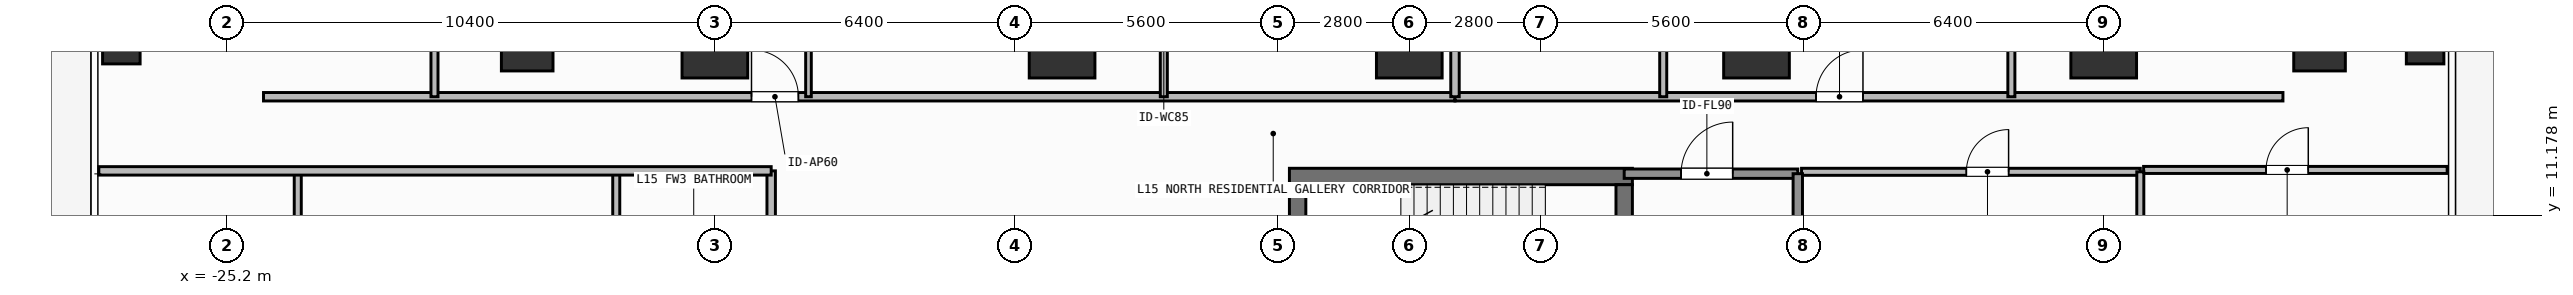
"""IFC4 building model, lengths in metres.
Left out: names, types, materials, properties, quantities, classifications, styles, units other than length and angle.
Written with IfcOpenShell. Run it as: python <this file> out.ifc"""

import sys

from ifc_helpers import new_model, si_unit, direction, frame, frame_2d, origin, origin_2d, place, context, subcontext, project, spatial, rectangle, hollow_rectangle, extrude, element, fill, save


model = new_model("IFC4")
c1 = context("Model", 3, precision=1e-05, world=origin(), true_north=direction((0.0, 1.0)))
c2 = subcontext(c1, "Body", "Model", "MODEL_VIEW")
j1 = project(units=[si_unit("LENGTHUNIT", "METRE"), si_unit("PLANEANGLEUNIT", "RADIAN")], contexts=[c1])
p1 = place(None, origin())
s1 = spatial("IfcSite", under=j1, at=p1, CompositionType="ELEMENT")
p2 = place(p1, origin())
s2 = spatial("IfcBuilding", under=s1, at=p2, CompositionType="ELEMENT")
p3 = place(p2, frame((0.0, 0.0, 57.9)))
s3 = spatial("IfcBuildingStorey", under=s2, at=p3, CompositionType="ELEMENT", Elevation=57.9)
p4 = place(p3, frame((-2.555, 12.0, 0.0), z_axis=(0.0, 0.0, 1.0), x_axis=(1.0, 0.0, 0.0)))
e1 = element("IfcWall", 1, at=p4, inside=s3, PredefinedType="SHEAR", context=c2, shape_type="SweptSolid", body=[
    extrude(rectangle(XDim=7.31, YDim=0.35, at=frame_2d((3.655, 0.0))), origin(), (0.0, 0.0, 1.0), 3.9),
])
p5 = place(p3, frame((-2.38, 8.9, 0.0), z_axis=(0.0, 0.0, 1.0), x_axis=(0.0, 1.0, 0.0)))
e2 = element("IfcWall", 2, at=p5, inside=s3, PredefinedType="SHEAR", context=c2, shape_type="SweptSolid", body=[
    extrude(rectangle(XDim=2.925, YDim=0.35, at=frame_2d((1.462, 0.0))), origin(), (0.0, 0.0, 1.0), 3.9),
])
p6 = place(p3, frame((4.58, 11.825, 0.0), z_axis=(0.0, 0.0, 1.0), x_axis=(0.0, -1.0, 0.0)))
e3 = element("IfcWall", 3, at=p6, inside=s3, PredefinedType="SHEAR", context=c2, shape_type="SweptSolid", body=[
    extrude(rectangle(XDim=2.925, YDim=0.35, at=frame_2d((1.462, 0.0))), origin(), (0.0, 0.0, 1.0), 3.9),
])
p7 = place(p6, frame((0.913, 0.0, 0.0)))
e4 = element("IfcOpeningElement", 4, at=p7, cuts=e3, PredefinedType="OPENING", context=c2, shape_type="SweptSolid", body=[
    extrude(rectangle(XDim=1.1, YDim=2.15, at=frame_2d((0.55, 1.075))), frame((0.0, 0.185, 0.0), z_axis=(0.0, -1.0, 0.0), x_axis=(1.0, 0.0, 0.0)), (0.0, 0.0, 1.0), 0.37),
])
for number, where, z_axis, x_axis in (
    (5, (-14.8, 14.8, 0.0), (0.0, 0.0, 1.0), (1.0, 0.0, 0.0)),
    (6, (-7.4, 14.8, 0.0), (0.0, 0.0, 1.0), (1.0, 0.0, 0.0)),
    (7, (0.0, 14.8, 0.0), (0.0, 0.0, 1.0), (1.0, 0.0, 0.0)),
    (8, (7.4, 14.8, 0.0), (0.0, 0.0, 1.0), (1.0, 0.0, 0.0)),
    (9, (14.8, 14.8, 0.0), (0.0, 0.0, 1.0), (1.0, 0.0, 0.0)),
):
    element("IfcColumn", number, at=place(p3, frame(where, z_axis=z_axis, x_axis=x_axis)), inside=s3, PredefinedType="COLUMN", context=c2, shape_type="SweptSolid", body=[
        extrude(rectangle(XDim=1.4, YDim=1.4, at=origin_2d()), origin(), (0.0, 0.0, 1.0), 3.9),
    ])
for number, where, z_axis, x_axis in (
    (10, (-18.8, 14.8, 0.0), (0.0, 0.0, 1.0), (1.0, 0.0, 0.0)),
    (11, (19.4, 14.8, 0.0), (0.0, 0.0, 1.0), (1.0, 0.0, 0.0)),
):
    element("IfcColumn", number, at=place(p3, frame(where, z_axis=z_axis, x_axis=x_axis)), inside=s3, PredefinedType="COLUMN", context=c2, shape_type="SweptSolid", body=[
        extrude(rectangle(XDim=1.1, YDim=1.1, at=origin_2d()), origin(), (0.0, 0.0, 1.0), 3.9),
    ])
for number, where, z_axis, x_axis in (
    (12, (-27.45, 14.8, 0.0), (0.0, 0.0, 1.0), (1.0, 0.0, 0.0)),
    (13, (21.65, 14.8, 0.0), (0.0, 0.0, 1.0), (1.0, 0.0, 0.0)),
):
    element("IfcColumn", number, at=place(p3, frame(where, z_axis=z_axis, x_axis=x_axis)), inside=s3, PredefinedType="COLUMN", context=c2, shape_type="SweptSolid", body=[
        extrude(hollow_rectangle(XDim=0.8, YDim=0.8, WallThickness=0.036, at=origin_2d()), origin(), (0.0, 0.0, 1.0), 3.9),
    ])
p8 = place(p3, frame((4.58, 12.06, 0.0), z_axis=(0.0, 0.0, 1.0), x_axis=(1.0, 0.0, 0.0)))
e14 = element("IfcWall", 14, at=p8, inside=s3, PredefinedType="SOLIDWALL", context=c2, shape_type="SweptSolid", body=[
    extrude(rectangle(XDim=3.7, YDim=0.2, at=frame_2d((1.85, 0.0))), origin(), (0.0, 0.0, 1.0), 3.68),
])
p9 = place(p8, frame((1.212, 0.0, 0.0)))
e15 = element("IfcOpeningElement", 15, at=p9, cuts=e14, PredefinedType="OPENING", context=c2, shape_type="SweptSolid", body=[
    extrude(rectangle(XDim=1.1, YDim=2.15, at=frame_2d((0.55, 1.075))), frame((0.0, 0.11, 0.0), z_axis=(0.0, -1.0, 0.0), x_axis=(1.0, 0.0, 0.0)), (0.0, 0.0, 1.0), 0.22),
])
p10 = place(p3, frame((8.36, 12.1, 0.0), z_axis=(0.0, 0.0, 1.0), x_axis=(1.0, 0.0, 0.0)))
e16 = element("IfcWall", 16, at=p10, inside=s3, PredefinedType="PARTITIONING", context=c2, shape_type="SweptSolid", body=[
    extrude(rectangle(XDim=7.22, YDim=0.15, at=frame_2d((3.61, 0.0))), origin(), (0.0, 0.0, 1.0), 3.68),
])
p11 = place(p10, frame((3.513, 0.0, 0.0)))
e17 = element("IfcOpeningElement", 17, at=p11, cuts=e16, PredefinedType="OPENING", context=c2, shape_type="SweptSolid", body=[
    extrude(rectangle(XDim=0.9, YDim=2.1, at=frame_2d((0.45, 1.05))), frame((0.0, 0.085, 0.0), z_axis=(0.0, -1.0, 0.0), x_axis=(1.0, 0.0, 0.0)), (0.0, 0.0, 1.0), 0.17),
])
p12 = place(p3, frame((-24.42, 13.7, 0.0), z_axis=(0.0, 0.0, 1.0), x_axis=(1.0, 0.0, 0.0)))
e18 = element("IfcWall", 18, at=p12, inside=s3, PredefinedType="PARTITIONING", context=c2, shape_type="SweptSolid", body=[
    extrude(rectangle(XDim=25.394, YDim=0.18, at=frame_2d((12.697, 0.0))), origin(), (0.0, 0.0, 1.0), 3.68),
])
p13 = place(p12, frame((10.4, 0.0, 0.0)))
e19 = element("IfcOpeningElement", 19, at=p13, cuts=e18, PredefinedType="OPENING", context=c2, shape_type="SweptSolid", body=[
    extrude(rectangle(XDim=1.0, YDim=2.2, at=frame_2d((0.5, 1.1))), frame((0.0, 0.1, 0.0), z_axis=(0.0, -1.0, 0.0), x_axis=(1.0, 0.0, 0.0)), (0.0, 0.0, 1.0), 0.2),
])
p14 = place(p3, frame((-12.805, 13.7, 0.0), z_axis=(0.0, 0.0, 1.0), x_axis=(0.0, 1.0, 0.0)))
e20 = element("IfcWall", 20, at=p14, inside=s3, PredefinedType="PARTITIONING", context=c2, shape_type="SweptSolid", body=[
    extrude(rectangle(XDim=7.09, YDim=0.12, at=frame_2d((3.545, 0.0))), origin(), (0.0, 0.0, 1.0), 3.68),
])
p15 = place(p14, frame((3.006, 0.0, 0.0)))
e21 = element("IfcOpeningElement", 21, at=p15, cuts=e20, PredefinedType="OPENING", context=c2, shape_type="SweptSolid", body=[
    extrude(rectangle(XDim=0.9, YDim=2.1, at=frame_2d((0.45, 1.05))), frame((0.0, 0.07, 0.0), z_axis=(0.0, -1.0, 0.0), x_axis=(1.0, 0.0, 0.0)), (0.0, 0.0, 1.0), 0.14),
])
p16 = place(p3, frame((-20.776, 13.7, 0.0), z_axis=(0.0, 0.0, 1.0), x_axis=(0.0, 1.0, 0.0)))
e22 = element("IfcWall", 22, at=p16, inside=s3, PredefinedType="PARTITIONING", context=c2, shape_type="SweptSolid", body=[
    extrude(rectangle(XDim=7.09, YDim=0.15, at=frame_2d((3.545, 0.0))), origin(), (0.0, 0.0, 1.0), 3.68),
])
p17 = place(p16, frame((3.03, 0.0, 0.0)))
e23 = element("IfcOpeningElement", 23, at=p17, cuts=e22, PredefinedType="OPENING", context=c2, shape_type="SweptSolid", body=[
    extrude(rectangle(XDim=0.85, YDim=2.1, at=frame_2d((0.425, 1.05))), frame((0.0, 0.085, 0.0), z_axis=(0.0, -1.0, 0.0), x_axis=(1.0, 0.0, 0.0)), (0.0, 0.0, 1.0), 0.17),
])
p18 = place(p3, frame((-5.232, 13.7, 0.0), z_axis=(0.0, 0.0, 1.0), x_axis=(0.0, 1.0, 0.0)))
e24 = element("IfcWall", 24, at=p18, inside=s3, PredefinedType="PARTITIONING", context=c2, shape_type="SweptSolid", body=[
    extrude(rectangle(XDim=2.907, YDim=0.15, at=frame_2d((1.454, 0.0))), origin(), (0.0, 0.0, 1.0), 3.68),
])
p19 = place(p18, frame((1.029, 0.0, 0.0)))
e25 = element("IfcOpeningElement", 25, at=p19, cuts=e24, PredefinedType="OPENING", context=c2, shape_type="SweptSolid", body=[
    extrude(rectangle(XDim=0.85, YDim=2.1, at=frame_2d((0.425, 1.05))), frame((0.0, 0.085, 0.0), z_axis=(0.0, -1.0, 0.0), x_axis=(1.0, 0.0, 0.0)), (0.0, 0.0, 1.0), 0.17),
])
p20 = place(p3, frame((0.974, 13.7, 0.0), z_axis=(0.0, 0.0, 1.0), x_axis=(1.0, 0.0, 0.0)))
e26 = element("IfcWall", 26, at=p20, inside=s3, PredefinedType="PARTITIONING", context=c2, shape_type="SweptSolid", body=[
    extrude(rectangle(XDim=17.646, YDim=0.18, at=frame_2d((8.823, 0.0))), origin(), (0.0, 0.0, 1.0), 3.68),
])
p21 = place(p20, frame((7.695, 0.0, 0.0)))
e27 = element("IfcOpeningElement", 27, at=p21, cuts=e26, PredefinedType="OPENING", context=c2, shape_type="SweptSolid", body=[
    extrude(rectangle(XDim=1.0, YDim=2.2, at=frame_2d((0.5, 1.1))), frame((0.0, 0.1, 0.0), z_axis=(0.0, -1.0, 0.0), x_axis=(1.0, 0.0, 0.0)), (0.0, 0.0, 1.0), 0.2),
])
p22 = place(p3, frame((5.412, 13.7, 0.0), z_axis=(0.0, 0.0, 1.0), x_axis=(0.0, 1.0, 0.0)))
e28 = element("IfcWall", 28, at=p22, inside=s3, PredefinedType="PARTITIONING", context=c2, shape_type="SweptSolid", body=[
    extrude(rectangle(XDim=7.09, YDim=0.15, at=frame_2d((3.545, 0.0))), origin(), (0.0, 0.0, 1.0), 3.68),
])
p23 = place(p22, frame((3.03, 0.0, 0.0)))
e29 = element("IfcOpeningElement", 29, at=p23, cuts=e28, PredefinedType="OPENING", context=c2, shape_type="SweptSolid", body=[
    extrude(rectangle(XDim=0.85, YDim=2.1, at=frame_2d((0.425, 1.05))), frame((0.0, 0.085, 0.0), z_axis=(0.0, -1.0, 0.0), x_axis=(1.0, 0.0, 0.0)), (0.0, 0.0, 1.0), 0.17),
])
p24 = place(p3, frame((12.832, 13.7, 0.0), z_axis=(0.0, 0.0, 1.0), x_axis=(0.0, 1.0, 0.0)))
e30 = element("IfcWall", 30, at=p24, inside=s3, PredefinedType="PARTITIONING", context=c2, shape_type="SweptSolid", body=[
    extrude(rectangle(XDim=4.963, YDim=0.15, at=frame_2d((2.481, 0.0))), origin(), (0.0, 0.0, 1.0), 3.68),
])
p25 = place(p24, frame((2.056, 0.0, 0.0)))
e31 = element("IfcOpeningElement", 31, at=p25, cuts=e30, PredefinedType="OPENING", context=c2, shape_type="SweptSolid", body=[
    extrude(rectangle(XDim=0.85, YDim=2.1, at=frame_2d((0.425, 1.05))), frame((0.0, 0.085, 0.0), z_axis=(0.0, -1.0, 0.0), x_axis=(1.0, 0.0, 0.0)), (0.0, 0.0, 1.0), 0.17),
])
p26 = place(p3, frame((-13.6, 4.04, 0.0), z_axis=(0.0, 0.0, 1.0), x_axis=(0.0, 1.0, 0.0)))
e32 = element("IfcWall", 32, at=p26, inside=s3, PredefinedType="PARTITIONING", context=c2, shape_type="SweptSolid", body=[
    extrude(rectangle(XDim=8.08, YDim=0.18, at=frame_2d((4.04, 0.0))), origin(), (0.0, 0.0, 1.0), 3.68),
])
p27 = place(p26, frame((1.583, 0.0, 0.0)))
e33 = element("IfcOpeningElement", 33, at=p27, cuts=e32, PredefinedType="OPENING", context=c2, shape_type="SweptSolid", body=[
    extrude(rectangle(XDim=1.0, YDim=2.2, at=frame_2d((0.5, 1.1))), frame((0.0, 0.1, 0.0), z_axis=(0.0, -1.0, 0.0), x_axis=(1.0, 0.0, 0.0)), (0.0, 0.0, 1.0), 0.2),
])
p28 = place(p3, frame((15.65, 12.14, 0.0), z_axis=(0.0, 0.0, 1.0), x_axis=(1.0, 0.0, 0.0)))
e34 = element("IfcWall", 34, at=p28, inside=s3, PredefinedType="PARTITIONING", context=c2, shape_type="SweptSolid", body=[
    extrude(rectangle(XDim=6.47, YDim=0.15, at=frame_2d((3.235, 0.0))), origin(), (0.0, 0.0, 1.0), 3.68),
])
p29 = place(p28, frame((2.61, 0.0, 0.0)))
e35 = element("IfcOpeningElement", 35, at=p29, cuts=e34, PredefinedType="OPENING", context=c2, shape_type="SweptSolid", body=[
    extrude(rectangle(XDim=0.9, YDim=2.1, at=frame_2d((0.45, 1.05))), frame((0.0, 0.085, 0.0), z_axis=(0.0, -1.0, 0.0), x_axis=(1.0, 0.0, 0.0)), (0.0, 0.0, 1.0), 0.17),
])
p30 = place(p3, frame((8.28, 8.95, 0.0), z_axis=(0.0, 0.0, 1.0), x_axis=(0.0, 1.0, 0.0)))
e36 = element("IfcWall", 36, at=p30, inside=s3, PredefinedType="SOLIDWALL", context=c2, shape_type="SweptSolid", body=[
    extrude(rectangle(XDim=3.11, YDim=0.2, at=frame_2d((1.555, 0.0))), origin(), (0.0, 0.0, 1.0), 3.68),
])
p31 = place(p3, frame((15.58, 5.85, 0.0), z_axis=(0.0, 0.0, 1.0), x_axis=(0.0, 1.0, 0.0)))
e37 = element("IfcWall", 37, at=p31, inside=s3, PredefinedType="PARTITIONING", context=c2, shape_type="SweptSolid", body=[
    extrude(rectangle(XDim=6.25, YDim=0.15, at=frame_2d((3.125, 0.0))), origin(), (0.0, 0.0, 1.0), 3.68),
])
p32 = place(p3, frame((0.974, 13.7, 0.0), z_axis=(0.0, 0.0, 1.0), x_axis=(0.0, 1.0, 0.0)))
e38 = element("IfcWall", 38, at=p32, inside=s3, PredefinedType="PARTITIONING", context=c2, shape_type="SweptSolid", body=[
    extrude(rectangle(XDim=11.33, YDim=0.18, at=frame_2d((5.665, 0.0))), origin(), (0.0, 0.0, 1.0), 3.68),
])
for number, where, z_axis, x_axis in (
    (39, (-16.902, 9.32, 0.0), (0.0, 0.0, 1.0), (0.0, 1.0, 0.0)),
    (40, (-23.69, 9.32, 0.0), (0.0, 0.0, 1.0), (0.0, 1.0, 0.0)),
):
    element("IfcWall", number, at=place(p3, frame(where, z_axis=z_axis, x_axis=x_axis)), inside=s3, PredefinedType="PARTITIONING", context=c2, shape_type="SweptSolid", body=[
        extrude(rectangle(XDim=2.8, YDim=0.15, at=frame_2d((1.4, 0.0))), origin(), (0.0, 0.0, 1.0), 3.68),
    ])
p33 = place(p3, frame((-27.93, 12.12, 0.0), z_axis=(0.0, 0.0, 1.0), x_axis=(1.0, 0.0, 0.0)))
e41 = element("IfcWall", 41, at=p33, inside=s3, PredefinedType="PARTITIONING", context=c2, shape_type="SweptSolid", body=[
    extrude(rectangle(XDim=14.33, YDim=0.18, at=frame_2d((7.165, 0.0))), origin(), (0.0, 0.0, 1.0), 3.68),
])
p34 = place(p9, origin())
e42 = element("IfcDoor", 42, at=p34, inside=s3, OperationType="SINGLE_SWING_RIGHT", PredefinedType="DOOR", context=c2, shape_type="SweptSolid", body=[
    extrude(rectangle(XDim=1.1, YDim=2.15, at=frame_2d((0.55, 1.075))), frame((0.0, 0.025, 0.0), z_axis=(0.0, -1.0, 0.0), x_axis=(1.0, 0.0, 0.0)), (0.0, 0.0, 1.0), 0.05),
])
fill(e15, e42)
p35 = place(p11, origin())
e43 = element("IfcDoor", 43, at=p35, inside=s3, OperationType="SINGLE_SWING_RIGHT", PredefinedType="DOOR", context=c2, shape_type="SweptSolid", body=[
    extrude(rectangle(XDim=0.9, YDim=2.1, at=frame_2d((0.45, 1.05))), frame((0.0, 0.025, 0.0), z_axis=(0.0, -1.0, 0.0), x_axis=(1.0, 0.0, 0.0)), (0.0, 0.0, 1.0), 0.05),
])
fill(e17, e43)
p36 = place(p13, origin())
e44 = element("IfcDoor", 44, at=p36, inside=s3, OperationType="SINGLE_SWING_LEFT", PredefinedType="DOOR", context=c2, shape_type="SweptSolid", body=[
    extrude(rectangle(XDim=1.0, YDim=2.2, at=frame_2d((0.5, 1.1))), frame((0.0, 0.025, 0.0), z_axis=(0.0, -1.0, 0.0), x_axis=(1.0, 0.0, 0.0)), (0.0, 0.0, 1.0), 0.05),
])
fill(e19, e44)
p37 = place(p21, origin())
e45 = element("IfcDoor", 45, at=p37, inside=s3, OperationType="SINGLE_SWING_RIGHT", PredefinedType="DOOR", context=c2, shape_type="SweptSolid", body=[
    extrude(rectangle(XDim=1.0, YDim=2.2, at=frame_2d((0.5, 1.1))), frame((0.0, 0.025, 0.0), z_axis=(0.0, -1.0, 0.0), x_axis=(1.0, 0.0, 0.0)), (0.0, 0.0, 1.0), 0.05),
])
fill(e27, e45)
p38 = place(p29, origin())
e46 = element("IfcDoor", 46, at=p38, inside=s3, OperationType="SINGLE_SWING_RIGHT", PredefinedType="DOOR", context=c2, shape_type="SweptSolid", body=[
    extrude(rectangle(XDim=0.9, YDim=2.1, at=frame_2d((0.45, 1.05))), frame((0.0, 0.025, 0.0), z_axis=(0.0, -1.0, 0.0), x_axis=(1.0, 0.0, 0.0)), (0.0, 0.0, 1.0), 0.05),
])
fill(e35, e46)
save(model, sys.argv[1])
